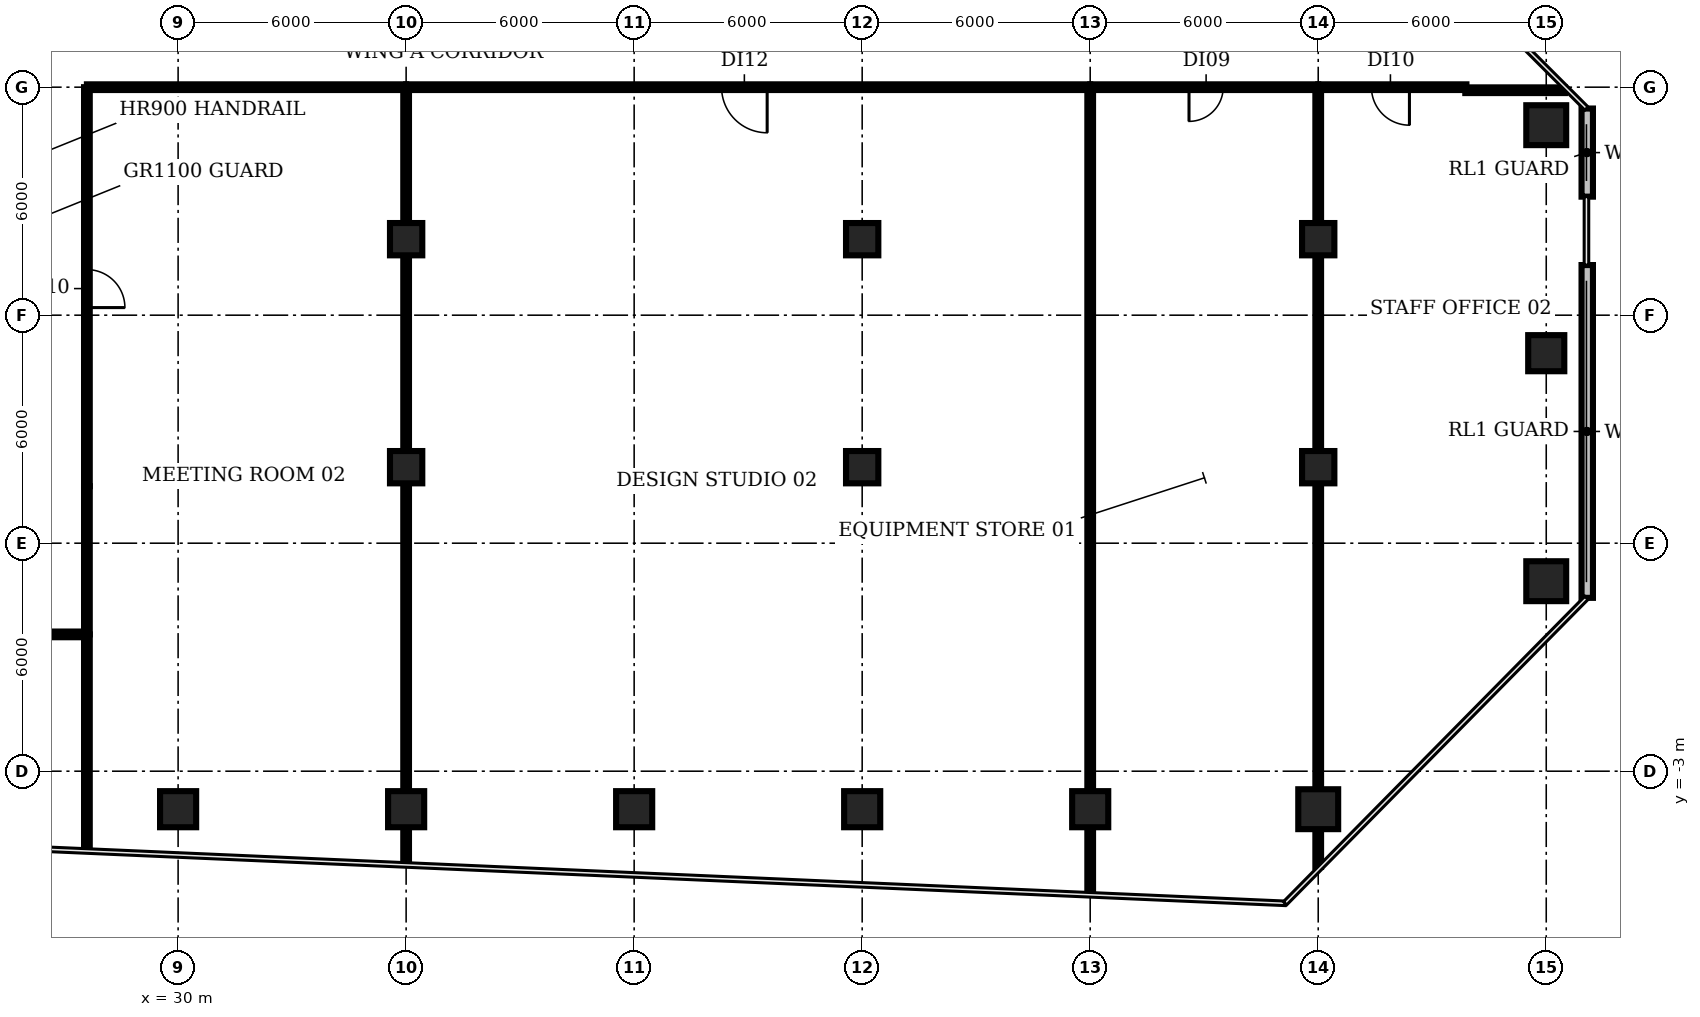
"""IFC4 building model, lengths in metres.
Left out: names, types, materials, properties, quantities, classifications, styles, units other than length and angle.
Written with IfcOpenShell. Run it as: python <this file> out.ifc"""

import sys

from ifc_helpers import new_model, si_unit, direction, frame, frame_2d, origin, origin_2d, place, context, subcontext, project, spatial, rectangle, circle, extrude, element, fill, save


model = new_model("IFC4")
c1 = context("Model", 3, precision=1e-05, world=origin(), true_north=direction((0.0, 1.0)))
c2 = subcontext(c1, "Body", "Model", "MODEL_VIEW")
j1 = project(units=[si_unit("LENGTHUNIT", "METRE"), si_unit("PLANEANGLEUNIT", "RADIAN")], contexts=[c1])
p1 = place(None, origin())
s1 = spatial("IfcSite", under=j1, at=p1, CompositionType="ELEMENT")
p2 = place(p1, origin())
s2 = spatial("IfcBuilding", under=s1, at=p2, CompositionType="ELEMENT")
p3 = place(p2, frame((0.0, 0.0, 41.6)))
s3 = spatial("IfcBuildingStorey", under=s2, at=p3, CompositionType="ELEMENT", Elevation=41.6)
for number, where, z_axis, x_axis in (
    (1, (30.0, -4.0, 0.0), (0.0, 0.0, 1.0), (1.0, 0.0, 0.0)),
    (2, (36.0, -4.0, 0.0), (0.0, 0.0, 1.0), (1.0, 0.0, 0.0)),
):
    element("IfcColumn", number, at=place(p3, frame(where, z_axis=z_axis, x_axis=x_axis)), inside=s3, PredefinedType="COLUMN", context=c2, shape_type="SweptSolid", body=[
        extrude(rectangle(XDim=0.95, YDim=0.95, at=origin_2d()), origin(), (0.0, 0.0, 1.0), 3.85),
    ])
for number, where, z_axis, x_axis in (
    (3, (36.0, 5.0, 0.0), (0.0, 0.0, 1.0), (1.0, 0.0, 0.0)),
    (4, (36.0, 11.0, 0.0), (0.0, 0.0, 1.0), (1.0, 0.0, 0.0)),
):
    element("IfcColumn", number, at=place(p3, frame(where, z_axis=z_axis, x_axis=x_axis)), inside=s3, PredefinedType="COLUMN", context=c2, shape_type="SweptSolid", body=[
        extrude(rectangle(XDim=0.85, YDim=0.85, at=origin_2d()), origin(), (0.0, 0.0, 1.0), 3.85),
    ])
for number, where, z_axis, x_axis in (
    (5, (42.0, -4.0, 0.0), (0.0, 0.0, 1.0), (1.0, 0.0, 0.0)),
    (6, (48.0, -4.0, 0.0), (0.0, 0.0, 1.0), (1.0, 0.0, 0.0)),
):
    element("IfcColumn", number, at=place(p3, frame(where, z_axis=z_axis, x_axis=x_axis)), inside=s3, PredefinedType="COLUMN", context=c2, shape_type="SweptSolid", body=[
        extrude(rectangle(XDim=0.95, YDim=0.95, at=origin_2d()), origin(), (0.0, 0.0, 1.0), 3.85),
    ])
for number, where, z_axis, x_axis in (
    (7, (48.0, 5.0, 0.0), (0.0, 0.0, 1.0), (1.0, 0.0, 0.0)),
    (8, (48.0, 11.0, 0.0), (0.0, 0.0, 1.0), (1.0, 0.0, 0.0)),
):
    element("IfcColumn", number, at=place(p3, frame(where, z_axis=z_axis, x_axis=x_axis)), inside=s3, PredefinedType="COLUMN", context=c2, shape_type="SweptSolid", body=[
        extrude(rectangle(XDim=0.85, YDim=0.85, at=origin_2d()), origin(), (0.0, 0.0, 1.0), 3.85),
    ])
p4 = place(p3, frame((54.0, -4.0, 0.0), z_axis=(0.0, 0.0, 1.0), x_axis=(1.0, 0.0, 0.0)))
e9 = element("IfcColumn", 9, at=p4, inside=s3, PredefinedType="COLUMN", context=c2, shape_type="SweptSolid", body=[
    extrude(rectangle(XDim=0.95, YDim=0.95, at=origin_2d()), origin(), (0.0, 0.0, 1.0), 3.85),
])
p5 = place(p3, frame((60.0, -4.0, 0.0), z_axis=(0.0, 0.0, 1.0), x_axis=(1.0, 0.0, 0.0)))
e10 = element("IfcColumn", 10, at=p5, inside=s3, PredefinedType="COLUMN", context=c2, shape_type="SweptSolid", body=[
    extrude(circle(Radius=0.525, at=origin_2d()), origin(), (0.0, 0.0, 1.0), 3.85),
])
for number, where, z_axis, x_axis in (
    (11, (60.0, 5.0, 0.0), (0.0, 0.0, 1.0), (1.0, 0.0, 0.0)),
    (12, (60.0, 11.0, 0.0), (0.0, 0.0, 1.0), (1.0, 0.0, 0.0)),
):
    element("IfcColumn", number, at=place(p3, frame(where, z_axis=z_axis, x_axis=x_axis)), inside=s3, PredefinedType="COLUMN", context=c2, shape_type="SweptSolid", body=[
        extrude(rectangle(XDim=0.85, YDim=0.85, at=origin_2d()), origin(), (0.0, 0.0, 1.0), 3.85),
    ])
p6 = place(p3, frame((66.0, 2.0, 0.0), z_axis=(0.0, 0.0, 1.0), x_axis=(1.0, 0.0, 0.0)))
e13 = element("IfcColumn", 13, at=p6, inside=s3, PredefinedType="COLUMN", context=c2, shape_type="SweptSolid", body=[
    extrude(circle(Radius=0.525, at=origin_2d()), origin(), (0.0, 0.0, 1.0), 3.85),
])
p7 = place(p3, frame((66.0, 8.0, 0.0), z_axis=(0.0, 0.0, 1.0), x_axis=(1.0, 0.0, 0.0)))
e14 = element("IfcColumn", 14, at=p7, inside=s3, PredefinedType="COLUMN", context=c2, shape_type="SweptSolid", body=[
    extrude(rectangle(XDim=0.95, YDim=0.95, at=origin_2d()), origin(), (0.0, 0.0, 1.0), 3.85),
])
p8 = place(p3, frame((66.0, 14.0, 0.0), z_axis=(0.0, 0.0, 1.0), x_axis=(1.0, 0.0, 0.0)))
e15 = element("IfcColumn", 15, at=p8, inside=s3, PredefinedType="COLUMN", context=c2, shape_type="SweptSolid", body=[
    extrude(circle(Radius=0.525, at=origin_2d()), origin(), (0.0, 0.0, 1.0), 3.85),
])
p9 = place(p3, frame((67.079, 1.562, 0.0), z_axis=(0.0, 0.0, 1.0), x_axis=(0.0, 1.0, 0.0)))
e16 = element("IfcWall", 16, at=p9, inside=s3, PredefinedType="SOLIDWALL", context=c2, shape_type="SweptSolid", body=[
    extrude(rectangle(XDim=8.757, YDim=0.3, at=frame_2d((4.379, 0.0))), origin(), (0.0, 0.0, 1.0), 3.85),
])
p10 = place(p3, frame((67.079, 12.119, 0.0), z_axis=(0.0, 0.0, 1.0), x_axis=(0.0, 1.0, 0.0)))
e17 = element("IfcWall", 17, at=p10, inside=s3, PredefinedType="SOLIDWALL", context=c2, shape_type="SweptSolid", body=[
    extrude(rectangle(XDim=2.319, YDim=0.3, at=frame_2d((1.16, 0.0))), origin(), (0.0, 0.0, 1.0), 3.85),
])
p11 = place(p3, frame((27.6, -5.05, 0.0), z_axis=(0.0, 0.0, 1.0), x_axis=(0.0, 1.0, 0.0)))
e18 = element("IfcWall", 18, at=p11, inside=s3, PredefinedType="PARTITIONING", context=c2, shape_type="SweptSolid", body=[
    extrude(rectangle(XDim=5.65, YDim=0.15, at=frame_2d((2.825, 0.0))), origin(), (0.0, 0.0, 1.0), 2.83),
])
p12 = place(p3, frame((27.6, 0.6, 0.0), z_axis=(0.0, 0.0, 1.0), x_axis=(-1.0, 0.0, 0.0)))
e19 = element("IfcWall", 19, at=p12, inside=s3, PredefinedType="PARTITIONING", context=c2, shape_type="SweptSolid", body=[
    extrude(rectangle(XDim=25.2, YDim=0.15, at=frame_2d((12.6, 0.0))), origin(), (0.0, 0.0, 1.0), 2.83),
])
p13 = place(p12, frame((12.1, 0.0, 0.0)))
e20 = element("IfcOpeningElement", 20, at=p13, cuts=e19, PredefinedType="OPENING", context=c2, shape_type="SweptSolid", body=[
    extrude(rectangle(XDim=1.2, YDim=2.1, at=frame_2d((0.6, 1.05))), frame((0.0, 0.085, 0.0), z_axis=(0.0, -1.0, 0.0), x_axis=(1.0, 0.0, 0.0)), (0.0, 0.0, 1.0), 0.17),
])
p14 = place(p3, frame((27.6, 0.6, 0.0), z_axis=(0.0, 0.0, 1.0), x_axis=(0.0, 1.0, 0.0)))
e21 = element("IfcWall", 21, at=p14, inside=s3, PredefinedType="PARTITIONING", context=c2, shape_type="SweptSolid", body=[
    extrude(rectangle(XDim=3.9, YDim=0.15, at=frame_2d((1.95, 0.0))), origin(), (0.0, 0.0, 1.0), 2.83),
])
p15 = place(p3, frame((27.6, 15.0, 0.0), z_axis=(0.0, 0.0, 1.0), x_axis=(0.0, -1.0, 0.0)))
e22 = element("IfcWall", 22, at=p15, inside=s3, PredefinedType="PARTITIONING", context=c2, shape_type="SweptSolid", body=[
    extrude(rectangle(XDim=10.5, YDim=0.15, at=frame_2d((5.25, 0.0))), origin(), (0.0, 0.0, 1.0), 2.83),
])
p16 = place(p15, frame((4.8, 0.0, 0.0)))
e23 = element("IfcOpeningElement", 23, at=p16, cuts=e22, PredefinedType="OPENING", context=c2, shape_type="SweptSolid", body=[
    extrude(rectangle(XDim=1.0, YDim=2.1, at=frame_2d((0.5, 1.05))), frame((0.0, 0.085, 0.0), z_axis=(0.0, -1.0, 0.0), x_axis=(1.0, 0.0, 0.0)), (0.0, 0.0, 1.0), 0.17),
])
p17 = place(p3, frame((27.6, 15.0, 0.0), z_axis=(0.0, 0.0, 1.0), x_axis=(1.0, 0.0, 0.0)))
e24 = element("IfcWall", 24, at=p17, inside=s3, PredefinedType="PARTITIONING", context=c2, shape_type="SweptSolid", body=[
    extrude(rectangle(XDim=8.4, YDim=0.15, at=frame_2d((4.2, 0.0))), origin(), (0.0, 0.0, 1.0), 2.83),
])
p18 = place(p3, frame((36.0, -5.42, 0.0), z_axis=(0.0, 0.0, 1.0), x_axis=(0.0, 1.0, 0.0)))
e25 = element("IfcWall", 25, at=p18, inside=s3, PredefinedType="PARTITIONING", context=c2, shape_type="SweptSolid", body=[
    extrude(rectangle(XDim=20.42, YDim=0.15, at=frame_2d((10.21, 0.0))), origin(), (0.0, 0.0, 1.0), 2.83),
])
p19 = place(p3, frame((54.0, -6.2, 0.0), z_axis=(0.0, 0.0, 1.0), x_axis=(0.0, 1.0, 0.0)))
e26 = element("IfcWall", 26, at=p19, inside=s3, PredefinedType="PARTITIONING", context=c2, shape_type="SweptSolid", body=[
    extrude(rectangle(XDim=21.2, YDim=0.15, at=frame_2d((10.6, 0.0))), origin(), (0.0, 0.0, 1.0), 2.83),
])
p20 = place(p3, frame((54.0, 15.0, 0.0), z_axis=(0.0, 0.0, 1.0), x_axis=(-1.0, 0.0, 0.0)))
e27 = element("IfcWall", 27, at=p20, inside=s3, PredefinedType="PARTITIONING", context=c2, shape_type="SweptSolid", body=[
    extrude(rectangle(XDim=18.0, YDim=0.15, at=frame_2d((9.0, 0.0))), origin(), (0.0, 0.0, 1.0), 2.83),
])
p21 = place(p20, frame((8.5, 0.0, 0.0)))
e28 = element("IfcOpeningElement", 28, at=p21, cuts=e27, PredefinedType="OPENING", context=c2, shape_type="SweptSolid", body=[
    extrude(rectangle(XDim=1.2, YDim=2.1, at=frame_2d((0.6, 1.05))), frame((0.0, 0.085, 0.0), z_axis=(0.0, -1.0, 0.0), x_axis=(1.0, 0.0, 0.0)), (0.0, 0.0, 1.0), 0.17),
])
p22 = place(p3, frame((60.0, -5.52, 0.0), z_axis=(0.0, 0.0, 1.0), x_axis=(0.0, 1.0, 0.0)))
e29 = element("IfcWall", 29, at=p22, inside=s3, PredefinedType="PARTITIONING", context=c2, shape_type="SweptSolid", body=[
    extrude(rectangle(XDim=20.52, YDim=0.15, at=frame_2d((10.26, 0.0))), origin(), (0.0, 0.0, 1.0), 2.83),
])
p23 = place(p3, frame((60.0, 15.0, 0.0), z_axis=(0.0, 0.0, 1.0), x_axis=(-1.0, 0.0, 0.0)))
e30 = element("IfcWall", 30, at=p23, inside=s3, PredefinedType="PARTITIONING", context=c2, shape_type="SweptSolid", body=[
    extrude(rectangle(XDim=6.0, YDim=0.15, at=frame_2d((3.0, 0.0))), origin(), (0.0, 0.0, 1.0), 2.83),
])
p24 = place(p23, frame((2.5, 0.0, 0.0)))
e31 = element("IfcOpeningElement", 31, at=p24, cuts=e30, PredefinedType="OPENING", context=c2, shape_type="SweptSolid", body=[
    extrude(rectangle(XDim=0.9, YDim=2.1, at=frame_2d((0.45, 1.05))), frame((0.0, 0.085, 0.0), z_axis=(0.0, -1.0, 0.0), x_axis=(1.0, 0.0, 0.0)), (0.0, 0.0, 1.0), 0.17),
])
p25 = place(p3, frame((63.87, 14.92, 0.0), z_axis=(0.0, 0.0, 1.0), x_axis=(1.0, 0.0, 0.0)))
e32 = element("IfcWall", 32, at=p25, inside=s3, PredefinedType="PARTITIONING", context=c2, shape_type="SweptSolid", body=[
    extrude(rectangle(XDim=2.621, YDim=0.15, at=frame_2d((1.311, 0.0))), origin(), (0.0, 0.0, 1.0), 2.83),
])
p26 = place(p3, frame((63.9, 15.0, 0.0), z_axis=(0.0, 0.0, 1.0), x_axis=(-1.0, 0.0, 0.0)))
e33 = element("IfcWall", 33, at=p26, inside=s3, PredefinedType="PARTITIONING", context=c2, shape_type="SweptSolid", body=[
    extrude(rectangle(XDim=3.9, YDim=0.15, at=frame_2d((1.95, 0.0))), origin(), (0.0, 0.0, 1.0), 2.83),
])
p27 = place(p26, frame((1.5, 0.0, 0.0)))
e34 = element("IfcOpeningElement", 34, at=p27, cuts=e33, PredefinedType="OPENING", context=c2, shape_type="SweptSolid", body=[
    extrude(rectangle(XDim=1.0, YDim=2.1, at=frame_2d((0.5, 1.05))), frame((0.0, 0.085, 0.0), z_axis=(0.0, -1.0, 0.0), x_axis=(1.0, 0.0, 0.0)), (0.0, 0.0, 1.0), 0.17),
])
p28 = place(p16, origin())
e35 = element("IfcDoor", 35, at=p28, inside=s3, OperationType="SINGLE_SWING_RIGHT", PredefinedType="DOOR", context=c2, shape_type="SweptSolid", body=[
    extrude(rectangle(XDim=1.0, YDim=2.1, at=frame_2d((0.5, 1.05))), frame((0.0, 0.025, 0.0), z_axis=(0.0, -1.0, 0.0), x_axis=(1.0, 0.0, 0.0)), (0.0, 0.0, 1.0), 0.05),
])
fill(e23, e35)
p29 = place(p21, origin())
e36 = element("IfcDoor", 36, at=p29, inside=s3, OperationType="SINGLE_SWING_LEFT", PredefinedType="DOOR", context=c2, shape_type="SweptSolid", body=[
    extrude(rectangle(XDim=1.2, YDim=2.1, at=frame_2d((0.6, 1.05))), frame((0.0, 0.025, 0.0), z_axis=(0.0, -1.0, 0.0), x_axis=(1.0, 0.0, 0.0)), (0.0, 0.0, 1.0), 0.05),
])
fill(e28, e36)
p30 = place(p24, origin())
e37 = element("IfcDoor", 37, at=p30, inside=s3, OperationType="SINGLE_SWING_RIGHT", PredefinedType="DOOR", context=c2, shape_type="SweptSolid", body=[
    extrude(rectangle(XDim=0.9, YDim=2.1, at=frame_2d((0.45, 1.05))), frame((0.0, 0.025, 0.0), z_axis=(0.0, -1.0, 0.0), x_axis=(1.0, 0.0, 0.0)), (0.0, 0.0, 1.0), 0.05),
])
fill(e31, e37)
p31 = place(p27, origin())
e38 = element("IfcDoor", 38, at=p31, inside=s3, OperationType="SINGLE_SWING_LEFT", PredefinedType="DOOR", context=c2, shape_type="SweptSolid", body=[
    extrude(rectangle(XDim=1.0, YDim=2.1, at=frame_2d((0.5, 1.05))), frame((0.0, 0.025, 0.0), z_axis=(0.0, -1.0, 0.0), x_axis=(1.0, 0.0, 0.0)), (0.0, 0.0, 1.0), 0.05),
])
fill(e34, e38)
save(model, sys.argv[1])
